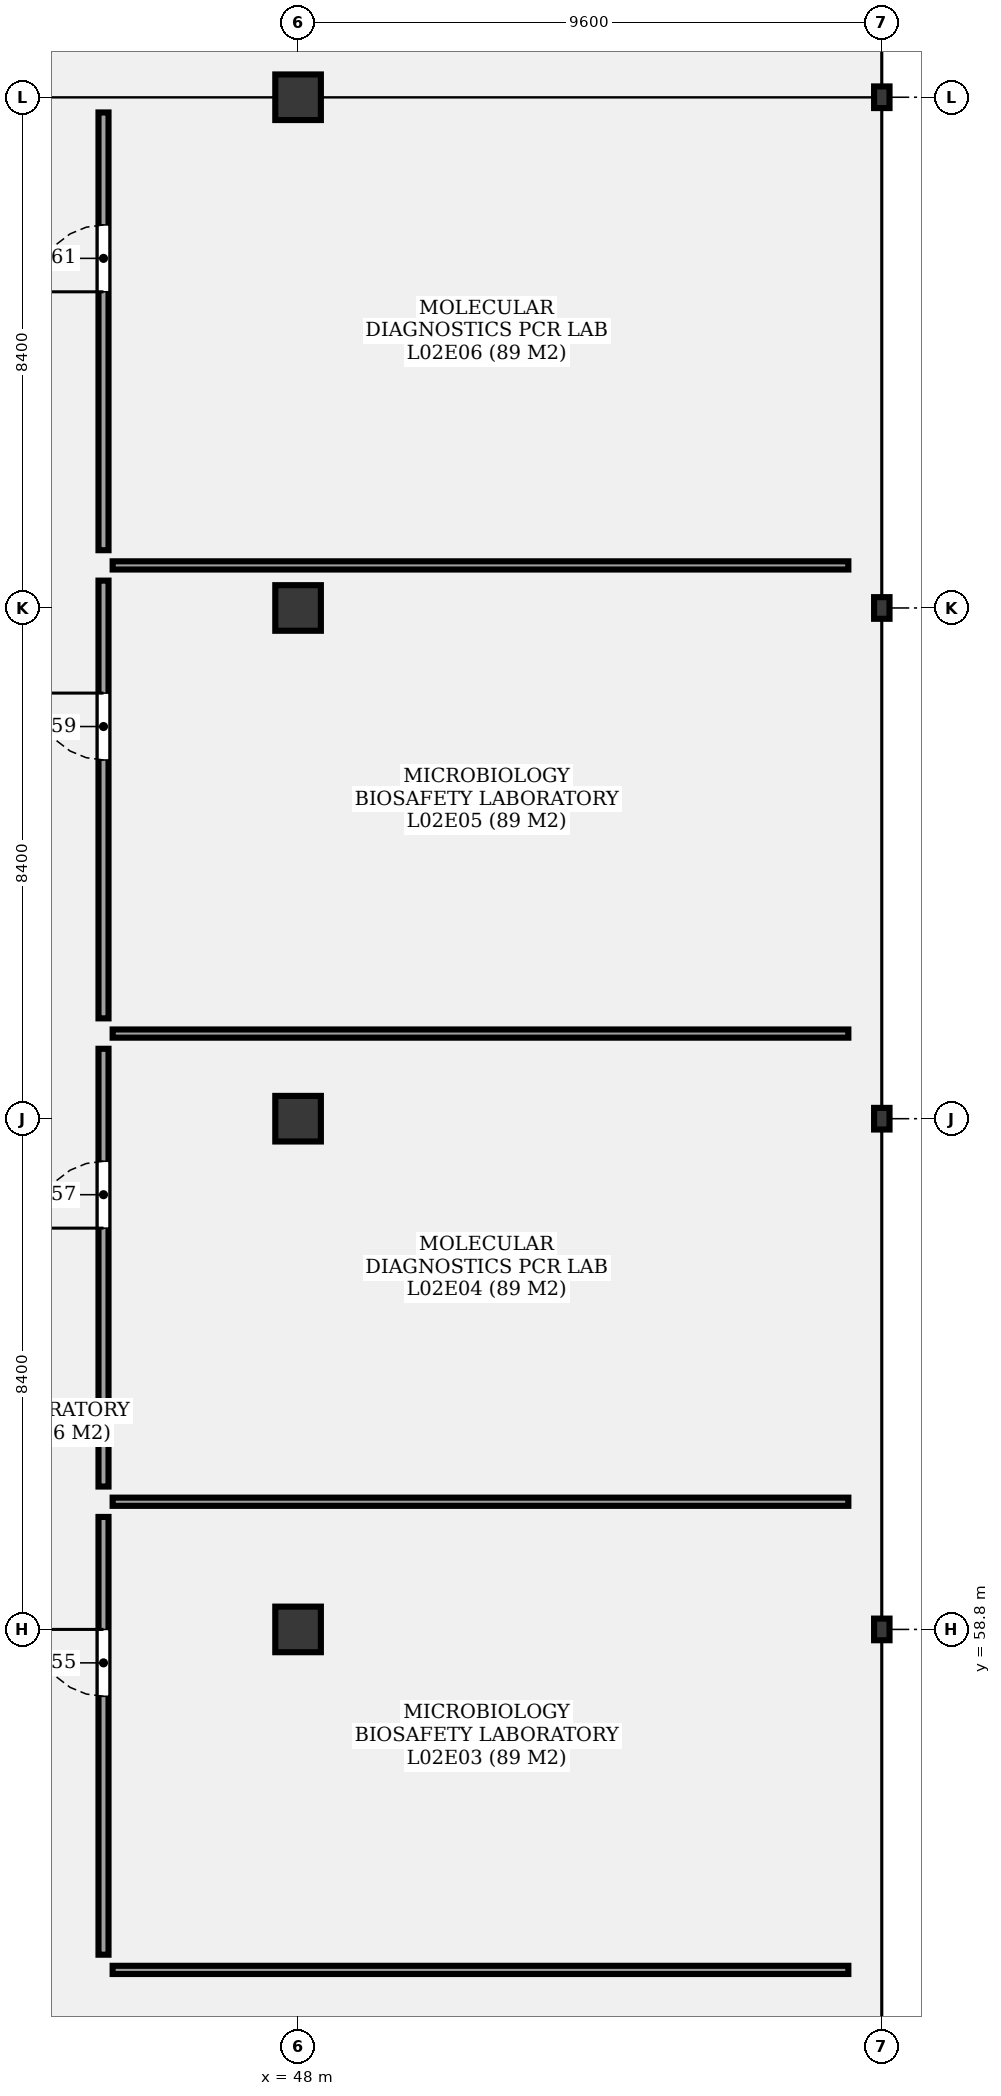
"""IFC4 building model, lengths in metres.
Left out: names, types, materials, properties, quantities, classifications, styles, units other than length and angle.
Written with IfcOpenShell. Run it as: python <this file> out.ifc"""

import sys

from ifc_helpers import new_model, si_unit, direction, frame, frame_2d, origin, origin_2d, place, context, subcontext, project, spatial, rectangle, i_section, extrude, element, fill, save


model = new_model("IFC4")
c1 = context("Model", 3, precision=1e-05, world=origin(), true_north=direction((0.0, 1.0)))
c2 = subcontext(c1, "Body", "Model", "MODEL_VIEW")
j1 = project(units=[si_unit("LENGTHUNIT", "METRE"), si_unit("PLANEANGLEUNIT", "RADIAN")], contexts=[c1])
p1 = place(None, origin())
s1 = spatial("IfcSite", under=j1, at=p1, CompositionType="ELEMENT")
p2 = place(p1, origin())
s2 = spatial("IfcBuilding", under=s1, at=p2, CompositionType="ELEMENT")
p3 = place(p2, frame((0.0, 0.0, 9.9)))
s3 = spatial("IfcBuildingStorey", under=s2, at=p3, CompositionType="ELEMENT", Elevation=9.9)
for number, where, z_axis, x_axis in (
    (1, (48.0, 58.8, 0.0), (0.0, 0.0, 1.0), (1.0, 0.0, 0.0)),
    (2, (48.0, 67.2, 0.0), (0.0, 0.0, 1.0), (1.0, 0.0, 0.0)),
    (3, (48.0, 75.6, 0.0), (0.0, 0.0, 1.0), (1.0, 0.0, 0.0)),
    (4, (48.0, 84.0, 0.0), (0.0, 0.0, 1.0), (1.0, 0.0, 0.0)),
):
    element("IfcColumn", number, at=place(p3, frame(where, z_axis=z_axis, x_axis=x_axis)), inside=s3, PredefinedType="COLUMN", context=c2, shape_type="SweptSolid", body=[
        extrude(rectangle(XDim=0.75, YDim=0.75, at=origin_2d()), origin(), (0.0, 0.0, 1.0), 3.6),
    ])
for number, where, z_axis, x_axis in (
    (5, (57.6, 58.8, 0.0), (0.0, 0.0, 1.0), (0.0, -1.0, 0.0)),
    (6, (57.6, 67.2, 0.0), (0.0, 0.0, 1.0), (0.0, -1.0, 0.0)),
    (7, (57.6, 75.6, 0.0), (0.0, 0.0, 1.0), (0.0, -1.0, 0.0)),
    (8, (57.6, 84.0, 0.0), (0.0, 0.0, 1.0), (0.0, -1.0, 0.0)),
):
    element("IfcColumn", number, at=place(p3, frame(where, z_axis=z_axis, x_axis=x_axis)), inside=s3, PredefinedType="COLUMN", context=c2, shape_type="SweptSolid", body=[
        extrude(i_section(OverallWidth=0.254, OverallDepth=0.356, WebThickness=0.011, FlangeThickness=0.018, at=origin_2d()), origin(), (0.0, 0.0, 1.0), 3.6),
    ])
p4 = place(p3, frame((44.8, 53.45, 0.0), z_axis=(0.0, 0.0, 1.0), x_axis=(0.0, 1.0, 0.0)))
e9 = element("IfcWall", 9, at=p4, inside=s3, PredefinedType="PARTITIONING", context=c2, shape_type="SweptSolid", body=[
    extrude(rectangle(XDim=7.2, YDim=0.165, at=frame_2d((3.6, 0.0))), origin(), (0.0, 0.0, 1.0), 2.48),
])
p5 = place(p4, frame((4.25, 0.0, 0.0)))
e10 = element("IfcOpeningElement", 10, at=p5, cuts=e9, PredefinedType="OPENING", context=c2, shape_type="SweptSolid", body=[
    extrude(rectangle(XDim=1.1, YDim=2.4, at=frame_2d((0.55, 1.2))), frame((0.0, 0.093, 0.0), z_axis=(0.0, -1.0, 0.0), x_axis=(1.0, 0.0, 0.0)), (0.0, 0.0, 1.0), 0.185),
])
p6 = place(p3, frame((44.95, 53.2, 0.0), z_axis=(0.0, 0.0, 1.0), x_axis=(1.0, 0.0, 0.0)))
e11 = element("IfcWall", 11, at=p6, inside=s3, PredefinedType="PARTITIONING", context=c2, shape_type="SweptSolid", body=[
    extrude(rectangle(XDim=12.1, YDim=0.135, at=frame_2d((6.05, 0.0))), origin(), (0.0, 0.0, 1.0), 2.48),
])
p7 = place(p3, frame((44.8, 61.15, 0.0), z_axis=(0.0, 0.0, 1.0), x_axis=(0.0, 1.0, 0.0)))
e12 = element("IfcWall", 12, at=p7, inside=s3, PredefinedType="PARTITIONING", context=c2, shape_type="SweptSolid", body=[
    extrude(rectangle(XDim=7.2, YDim=0.165, at=frame_2d((3.6, 0.0))), origin(), (0.0, 0.0, 1.0), 2.48),
])
p8 = place(p7, frame((4.25, 0.0, 0.0)))
e13 = element("IfcOpeningElement", 13, at=p8, cuts=e12, PredefinedType="OPENING", context=c2, shape_type="SweptSolid", body=[
    extrude(rectangle(XDim=1.1, YDim=2.4, at=frame_2d((0.55, 1.2))), frame((0.0, 0.093, 0.0), z_axis=(0.0, -1.0, 0.0), x_axis=(1.0, 0.0, 0.0)), (0.0, 0.0, 1.0), 0.185),
])
p9 = place(p3, frame((44.95, 60.9, 0.0), z_axis=(0.0, 0.0, 1.0), x_axis=(1.0, 0.0, 0.0)))
e14 = element("IfcWall", 14, at=p9, inside=s3, PredefinedType="PARTITIONING", context=c2, shape_type="SweptSolid", body=[
    extrude(rectangle(XDim=12.1, YDim=0.135, at=frame_2d((6.05, 0.0))), origin(), (0.0, 0.0, 1.0), 2.48),
])
p10 = place(p3, frame((44.8, 68.85, 0.0), z_axis=(0.0, 0.0, 1.0), x_axis=(0.0, 1.0, 0.0)))
e15 = element("IfcWall", 15, at=p10, inside=s3, PredefinedType="PARTITIONING", context=c2, shape_type="SweptSolid", body=[
    extrude(rectangle(XDim=7.2, YDim=0.165, at=frame_2d((3.6, 0.0))), origin(), (0.0, 0.0, 1.0), 2.48),
])
p11 = place(p10, frame((4.25, 0.0, 0.0)))
e16 = element("IfcOpeningElement", 16, at=p11, cuts=e15, PredefinedType="OPENING", context=c2, shape_type="SweptSolid", body=[
    extrude(rectangle(XDim=1.1, YDim=2.4, at=frame_2d((0.55, 1.2))), frame((0.0, 0.093, 0.0), z_axis=(0.0, -1.0, 0.0), x_axis=(1.0, 0.0, 0.0)), (0.0, 0.0, 1.0), 0.185),
])
p12 = place(p3, frame((44.95, 68.6, 0.0), z_axis=(0.0, 0.0, 1.0), x_axis=(1.0, 0.0, 0.0)))
e17 = element("IfcWall", 17, at=p12, inside=s3, PredefinedType="PARTITIONING", context=c2, shape_type="SweptSolid", body=[
    extrude(rectangle(XDim=12.1, YDim=0.135, at=frame_2d((6.05, 0.0))), origin(), (0.0, 0.0, 1.0), 2.48),
])
p13 = place(p3, frame((44.8, 76.55, 0.0), z_axis=(0.0, 0.0, 1.0), x_axis=(0.0, 1.0, 0.0)))
e18 = element("IfcWall", 18, at=p13, inside=s3, PredefinedType="PARTITIONING", context=c2, shape_type="SweptSolid", body=[
    extrude(rectangle(XDim=7.2, YDim=0.165, at=frame_2d((3.6, 0.0))), origin(), (0.0, 0.0, 1.0), 2.48),
])
p14 = place(p13, frame((4.25, 0.0, 0.0)))
e19 = element("IfcOpeningElement", 19, at=p14, cuts=e18, PredefinedType="OPENING", context=c2, shape_type="SweptSolid", body=[
    extrude(rectangle(XDim=1.1, YDim=2.4, at=frame_2d((0.55, 1.2))), frame((0.0, 0.093, 0.0), z_axis=(0.0, -1.0, 0.0), x_axis=(1.0, 0.0, 0.0)), (0.0, 0.0, 1.0), 0.185),
])
p15 = place(p3, frame((44.95, 76.3, 0.0), z_axis=(0.0, 0.0, 1.0), x_axis=(1.0, 0.0, 0.0)))
e20 = element("IfcWall", 20, at=p15, inside=s3, PredefinedType="PARTITIONING", context=c2, shape_type="SweptSolid", body=[
    extrude(rectangle(XDim=12.1, YDim=0.135, at=frame_2d((6.05, 0.0))), origin(), (0.0, 0.0, 1.0), 2.48),
])
p16 = place(p5, origin())
e21 = element("IfcDoor", 21, at=p16, inside=s3, OperationType="SINGLE_SWING_RIGHT", PredefinedType="DOOR", context=c2, shape_type="SweptSolid", body=[
    extrude(rectangle(XDim=1.1, YDim=2.4, at=frame_2d((0.55, 1.2))), frame((0.0, 0.025, 0.0), z_axis=(0.0, -1.0, 0.0), x_axis=(1.0, 0.0, 0.0)), (0.0, 0.0, 1.0), 0.05),
])
fill(e10, e21)
p17 = place(p8, origin())
e22 = element("IfcDoor", 22, at=p17, inside=s3, OperationType="SINGLE_SWING_LEFT", PredefinedType="DOOR", context=c2, shape_type="SweptSolid", body=[
    extrude(rectangle(XDim=1.1, YDim=2.4, at=frame_2d((0.55, 1.2))), frame((0.0, 0.025, 0.0), z_axis=(0.0, -1.0, 0.0), x_axis=(1.0, 0.0, 0.0)), (0.0, 0.0, 1.0), 0.05),
])
fill(e13, e22)
p18 = place(p11, origin())
e23 = element("IfcDoor", 23, at=p18, inside=s3, OperationType="SINGLE_SWING_RIGHT", PredefinedType="DOOR", context=c2, shape_type="SweptSolid", body=[
    extrude(rectangle(XDim=1.1, YDim=2.4, at=frame_2d((0.55, 1.2))), frame((0.0, 0.025, 0.0), z_axis=(0.0, -1.0, 0.0), x_axis=(1.0, 0.0, 0.0)), (0.0, 0.0, 1.0), 0.05),
])
fill(e16, e23)
p19 = place(p14, origin())
e24 = element("IfcDoor", 24, at=p19, inside=s3, OperationType="SINGLE_SWING_LEFT", PredefinedType="DOOR", context=c2, shape_type="SweptSolid", body=[
    extrude(rectangle(XDim=1.1, YDim=2.4, at=frame_2d((0.55, 1.2))), frame((0.0, 0.025, 0.0), z_axis=(0.0, -1.0, 0.0), x_axis=(1.0, 0.0, 0.0)), (0.0, 0.0, 1.0), 0.05),
])
fill(e19, e24)
save(model, sys.argv[1])
